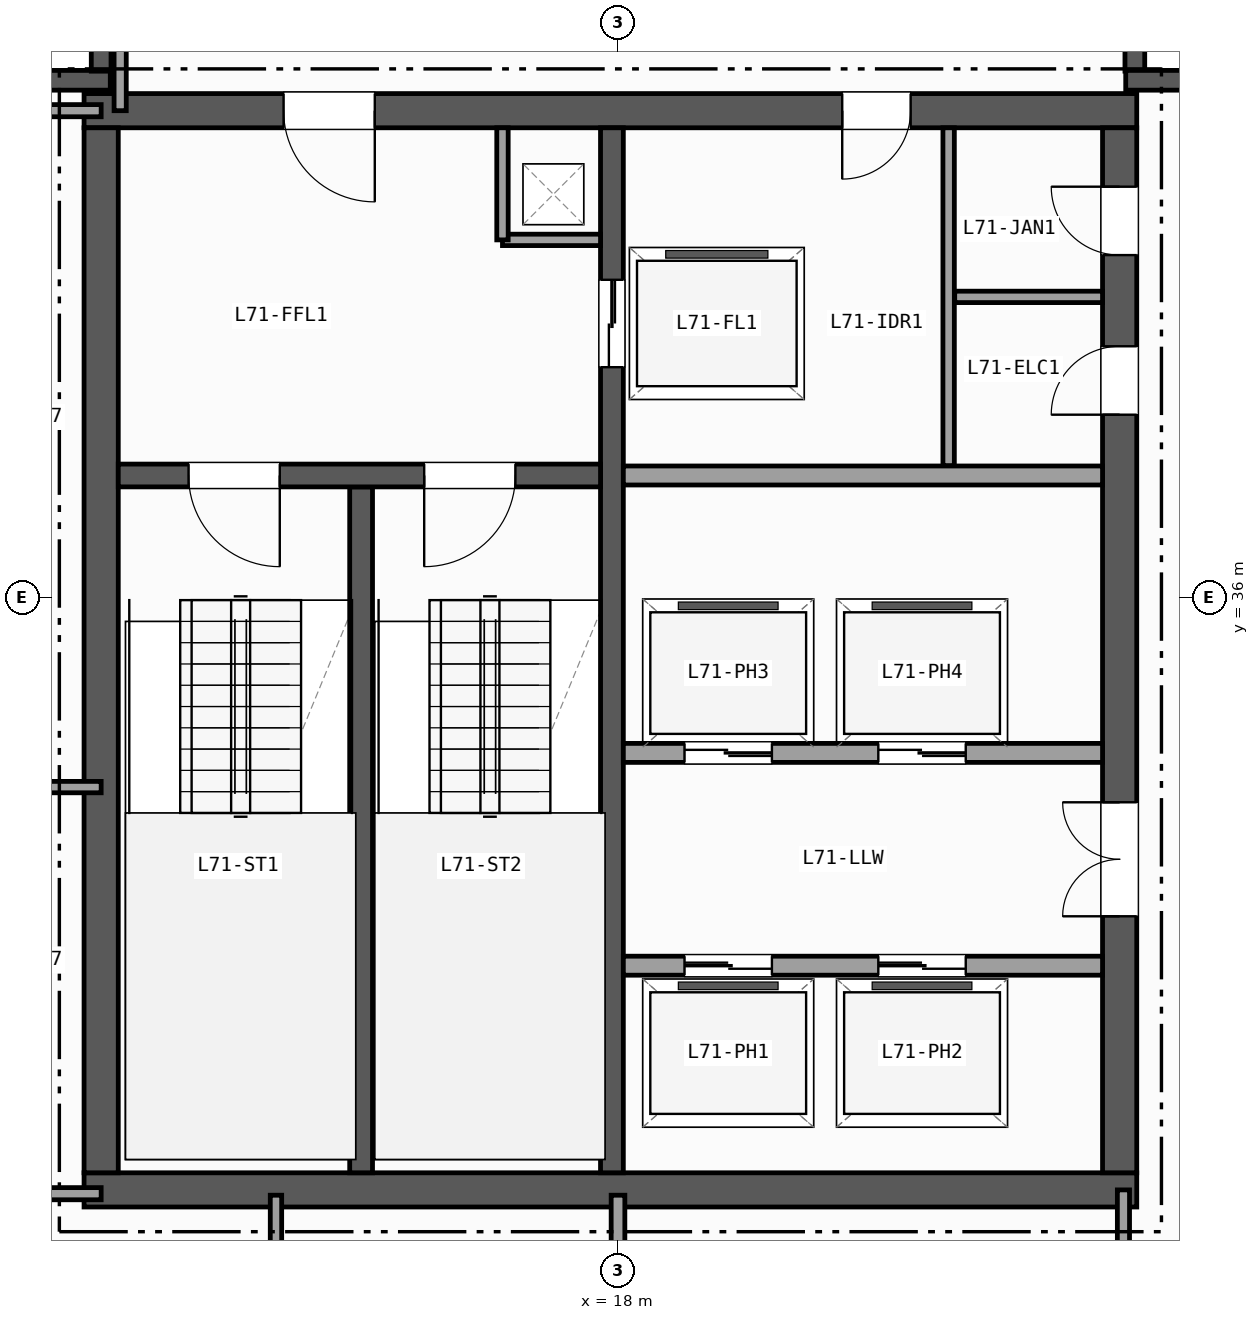
"""IFC4 building model, lengths in metres.
Left out: names, types, materials, properties, quantities, classifications, styles, units other than length and angle.
Written with IfcOpenShell. Run it as: python <this file> out.ifc"""

import sys

from ifc_helpers import new_model, si_unit, direction, frame, frame_2d, origin, place, context, subcontext, project, spatial, rectangle, extrude, element, fill, save


model = new_model("IFC4")
c1 = context("Model", 3, precision=1e-05, world=origin(), true_north=direction((0.0, 1.0)))
c2 = subcontext(c1, "Body", "Model", "MODEL_VIEW")
j1 = project(units=[si_unit("LENGTHUNIT", "METRE"), si_unit("PLANEANGLEUNIT", "RADIAN")], contexts=[c1])
p1 = place(None, origin())
s1 = spatial("IfcSite", under=j1, at=p1, CompositionType="ELEMENT")
p2 = place(p1, origin())
s2 = spatial("IfcBuilding", under=s1, at=p2, CompositionType="ELEMENT")
p3 = place(p2, frame((0.0, 0.0, 281.5)))
s3 = spatial("IfcBuildingStorey", under=s2, at=p3, CompositionType="ELEMENT", Elevation=281.5)
p4 = place(p3, frame((9.0, 42.8, 0.0), z_axis=(0.0, 0.0, 1.0), x_axis=(1.0, 0.0, 0.0)))
e1 = element("IfcWall", 1, at=p4, inside=s3, PredefinedType="SOLIDWALL", context=c2, shape_type="SweptSolid", body=[
    extrude(rectangle(XDim=2.32, YDim=0.26, at=frame_2d((1.16, 0.0))), origin(), (0.0, 0.0, 1.0), 3.37),
])
for number, where, z_axis, x_axis in (
    (2, (11.2, 42.92, 0.0), (0.0, 0.0, 1.0), (0.0, 1.0, 0.0)),
    (3, (24.8, 45.0, 0.0), (0.0, 0.0, 1.0), (0.0, -1.0, 0.0)),
):
    element("IfcWall", number, at=place(p3, frame(where, z_axis=z_axis, x_axis=x_axis)), inside=s3, PredefinedType="SOLIDWALL", context=c2, shape_type="SweptSolid", body=[
        extrude(rectangle(XDim=2.08, YDim=0.26, at=frame_2d((1.04, 0.0))), origin(), (0.0, 0.0, 1.0), 3.37),
    ])
p5 = place(p3, frame((24.68, 42.8, 0.0), z_axis=(0.0, 0.0, 1.0), x_axis=(1.0, 0.0, 0.0)))
e4 = element("IfcWall", 4, at=p5, inside=s3, PredefinedType="SOLIDWALL", context=c2, shape_type="SweptSolid", body=[
    extrude(rectangle(XDim=2.32, YDim=0.26, at=frame_2d((1.16, 0.0))), origin(), (0.0, 0.0, 1.0), 3.37),
])
p6 = place(p3, frame((10.975, 28.2, 0.0), z_axis=(0.0, 0.0, 1.0), x_axis=(1.0, 0.0, 0.0)))
e5 = element("IfcWall", 5, at=p6, inside=s3, PredefinedType="SHEAR", context=c2, shape_type="SweptSolid", body=[
    extrude(rectangle(XDim=13.85, YDim=0.45, at=frame_2d((6.925, 0.0))), origin(), (0.0, 0.0, 1.0), 3.37),
])
p7 = place(p3, frame((24.825, 42.4, 0.0), z_axis=(0.0, 0.0, 1.0), x_axis=(-1.0, 0.0, 0.0)))
e6 = element("IfcWall", 6, at=p7, inside=s3, PredefinedType="SHEAR", context=c2, shape_type="SweptSolid", body=[
    extrude(rectangle(XDim=13.85, YDim=0.45, at=frame_2d((6.925, 0.0))), origin(), (0.0, 0.0, 1.0), 3.37),
])
p8 = place(p7, frame((10.025, 0.0, 0.0)))
e7 = element("IfcOpeningElement", 7, at=p8, cuts=e6, PredefinedType="OPENING", context=c2, shape_type="SweptSolid", body=[
    extrude(rectangle(XDim=1.2, YDim=2.15, at=frame_2d((0.6, 1.075))), frame((0.0, 0.235, 0.0), z_axis=(0.0, -1.0, 0.0), x_axis=(1.0, 0.0, 0.0)), (0.0, 0.0, 1.0), 0.47),
])
p9 = place(p7, frame((2.975, 0.0, 0.0)))
e8 = element("IfcOpeningElement", 8, at=p9, cuts=e6, PredefinedType="OPENING", context=c2, shape_type="SweptSolid", body=[
    extrude(rectangle(XDim=0.9, YDim=2.1, at=frame_2d((0.45, 1.05))), frame((0.0, 0.235, 0.0), z_axis=(0.0, -1.0, 0.0), x_axis=(1.0, 0.0, 0.0)), (0.0, 0.0, 1.0), 0.47),
])
p10 = place(p3, frame((11.2, 42.175, 0.0), z_axis=(0.0, 0.0, 1.0), x_axis=(0.0, -1.0, 0.0)))
e9 = element("IfcWall", 9, at=p10, inside=s3, PredefinedType="SHEAR", context=c2, shape_type="SweptSolid", body=[
    extrude(rectangle(XDim=13.75, YDim=0.45, at=frame_2d((6.875, 0.0))), origin(), (0.0, 0.0, 1.0), 3.37),
])
p11 = place(p3, frame((24.6, 28.425, 0.0), z_axis=(0.0, 0.0, 1.0), x_axis=(0.0, 1.0, 0.0)))
e10 = element("IfcWall", 10, at=p11, inside=s3, PredefinedType="SHEAR", context=c2, shape_type="SweptSolid", body=[
    extrude(rectangle(XDim=13.75, YDim=0.45, at=frame_2d((6.875, 0.0))), origin(), (0.0, 0.0, 1.0), 3.37),
])
p12 = place(p11, frame((3.375, 0.0, 0.0)))
e11 = element("IfcOpeningElement", 11, at=p12, cuts=e10, PredefinedType="OPENING", context=c2, shape_type="SweptSolid", body=[
    extrude(rectangle(XDim=1.5, YDim=2.2, at=frame_2d((0.75, 1.1))), frame((0.0, 0.235, 0.0), z_axis=(0.0, -1.0, 0.0), x_axis=(1.0, 0.0, 0.0)), (0.0, 0.0, 1.0), 0.47),
])
p13 = place(p11, frame((9.975, 0.0, 0.0)))
e12 = element("IfcOpeningElement", 12, at=p13, cuts=e10, PredefinedType="OPENING", context=c2, shape_type="SweptSolid", body=[
    extrude(rectangle(XDim=0.9, YDim=2.1, at=frame_2d((0.45, 1.05))), frame((0.0, 0.235, 0.0), z_axis=(0.0, -1.0, 0.0), x_axis=(1.0, 0.0, 0.0)), (0.0, 0.0, 1.0), 0.47),
])
p14 = place(p11, frame((12.075, 0.0, 0.0)))
e13 = element("IfcOpeningElement", 13, at=p14, cuts=e10, PredefinedType="OPENING", context=c2, shape_type="SweptSolid", body=[
    extrude(rectangle(XDim=0.9, YDim=2.1, at=frame_2d((0.45, 1.05))), frame((0.0, 0.235, 0.0), z_axis=(0.0, -1.0, 0.0), x_axis=(1.0, 0.0, 0.0)), (0.0, 0.0, 1.0), 0.47),
])
p15 = place(p3, frame((14.62, 28.425, 0.0), z_axis=(0.0, 0.0, 1.0), x_axis=(0.0, 1.0, 0.0)))
e14 = element("IfcWall", 14, at=p15, inside=s3, PredefinedType="SHEAR", context=c2, shape_type="SweptSolid", body=[
    extrude(rectangle(XDim=9.025, YDim=0.3, at=frame_2d((4.512, 0.0))), origin(), (0.0, 0.0, 1.0), 3.37),
])
p16 = place(p3, frame((17.92, 42.175, 0.0), z_axis=(0.0, 0.0, 1.0), x_axis=(0.0, -1.0, 0.0)))
e15 = element("IfcWall", 15, at=p16, inside=s3, PredefinedType="SHEAR", context=c2, shape_type="SweptSolid", body=[
    extrude(rectangle(XDim=13.75, YDim=0.3, at=frame_2d((6.875, 0.0))), origin(), (0.0, 0.0, 1.0), 3.37),
])
p17 = place(p16, frame((2.0, 0.0, 0.0)))
e16 = element("IfcOpeningElement", 16, at=p17, cuts=e15, PredefinedType="OPENING", context=c2, shape_type="SweptSolid", body=[
    extrude(rectangle(XDim=1.15, YDim=2.15, at=frame_2d((0.575, 1.075))), frame((0.0, 0.16, 0.0), z_axis=(0.0, -1.0, 0.0), x_axis=(1.0, 0.0, 0.0)), (0.0, 0.0, 1.0), 0.32),
])
p18 = place(p3, frame((17.77, 37.6, 0.0), z_axis=(0.0, 0.0, 1.0), x_axis=(-1.0, 0.0, 0.0)))
e17 = element("IfcWall", 17, at=p18, inside=s3, PredefinedType="SHEAR", context=c2, shape_type="SweptSolid", body=[
    extrude(rectangle(XDim=6.345, YDim=0.3, at=frame_2d((3.172, 0.0))), origin(), (0.0, 0.0, 1.0), 3.37),
])
p19 = place(p18, frame((4.22, 0.0, 0.0)))
e18 = element("IfcOpeningElement", 18, at=p19, cuts=e17, PredefinedType="OPENING", context=c2, shape_type="SweptSolid", body=[
    extrude(rectangle(XDim=1.2, YDim=2.15, at=frame_2d((0.6, 1.075))), frame((0.0, 0.16, 0.0), z_axis=(0.0, -1.0, 0.0), x_axis=(1.0, 0.0, 0.0)), (0.0, 0.0, 1.0), 0.32),
])
p20 = place(p18, frame((1.12, 0.0, 0.0)))
e19 = element("IfcOpeningElement", 19, at=p20, cuts=e17, PredefinedType="OPENING", context=c2, shape_type="SweptSolid", body=[
    extrude(rectangle(XDim=1.2, YDim=2.15, at=frame_2d((0.6, 1.075))), frame((0.0, 0.16, 0.0), z_axis=(0.0, -1.0, 0.0), x_axis=(1.0, 0.0, 0.0)), (0.0, 0.0, 1.0), 0.32),
])
p21 = place(p3, frame((16.48, 40.7, 0.0), z_axis=(0.0, 0.0, 1.0), x_axis=(1.0, 0.0, 0.0)))
e20 = element("IfcWall", 20, at=p21, inside=s3, PredefinedType="PARTITIONING", context=c2, shape_type="SweptSolid", body=[
    extrude(rectangle(XDim=1.29, YDim=0.15, at=frame_2d((0.645, 0.0))), origin(), (0.0, 0.0, 1.0), 3.37),
])
p22 = place(p3, frame((16.48, 40.7, 0.0), z_axis=(0.0, 0.0, 1.0), x_axis=(0.0, 1.0, 0.0)))
e21 = element("IfcWall", 21, at=p22, inside=s3, PredefinedType="PARTITIONING", context=c2, shape_type="SweptSolid", body=[
    extrude(rectangle(XDim=1.475, YDim=0.15, at=frame_2d((0.738, 0.0))), origin(), (0.0, 0.0, 1.0), 3.37),
])
p23 = place(p3, frame((18.07, 37.6, 0.0), z_axis=(0.0, 0.0, 1.0), x_axis=(1.0, 0.0, 0.0)))
e22 = element("IfcWall", 22, at=p23, inside=s3, PredefinedType="PARTITIONING", context=c2, shape_type="SweptSolid", body=[
    extrude(rectangle(XDim=6.305, YDim=0.25, at=frame_2d((3.152, 0.0))), origin(), (0.0, 0.0, 1.0), 3.37),
])
p24 = place(p3, frame((18.07, 31.15, 0.0), z_axis=(0.0, 0.0, 1.0), x_axis=(1.0, 0.0, 0.0)))
e23 = element("IfcWall", 23, at=p24, inside=s3, PredefinedType="PARTITIONING", context=c2, shape_type="SweptSolid", body=[
    extrude(rectangle(XDim=6.305, YDim=0.25, at=frame_2d((3.152, 0.0))), origin(), (0.0, 0.0, 1.0), 3.37),
])
p25 = place(p24, frame((0.805, 0.0, 0.0)))
e24 = element("IfcOpeningElement", 24, at=p25, cuts=e23, PredefinedType="OPENING", context=c2, shape_type="SweptSolid", body=[
    extrude(rectangle(XDim=1.15, YDim=2.15, at=frame_2d((0.575, 1.075))), frame((0.0, 0.135, 0.0), z_axis=(0.0, -1.0, 0.0), x_axis=(1.0, 0.0, 0.0)), (0.0, 0.0, 1.0), 0.27),
])
p26 = place(p24, frame((3.355, 0.0, 0.0)))
e25 = element("IfcOpeningElement", 25, at=p26, cuts=e23, PredefinedType="OPENING", context=c2, shape_type="SweptSolid", body=[
    extrude(rectangle(XDim=1.15, YDim=2.15, at=frame_2d((0.575, 1.075))), frame((0.0, 0.135, 0.0), z_axis=(0.0, -1.0, 0.0), x_axis=(1.0, 0.0, 0.0)), (0.0, 0.0, 1.0), 0.27),
])
p27 = place(p3, frame((24.375, 33.95, 0.0), z_axis=(0.0, 0.0, 1.0), x_axis=(-1.0, 0.0, 0.0)))
e26 = element("IfcWall", 26, at=p27, inside=s3, PredefinedType="PARTITIONING", context=c2, shape_type="SweptSolid", body=[
    extrude(rectangle(XDim=6.305, YDim=0.25, at=frame_2d((3.152, 0.0))), origin(), (0.0, 0.0, 1.0), 3.37),
])
p28 = place(p27, frame((4.35, 0.0, 0.0)))
e27 = element("IfcOpeningElement", 27, at=p28, cuts=e26, PredefinedType="OPENING", context=c2, shape_type="SweptSolid", body=[
    extrude(rectangle(XDim=1.15, YDim=2.15, at=frame_2d((0.575, 1.075))), frame((0.0, 0.135, 0.0), z_axis=(0.0, -1.0, 0.0), x_axis=(1.0, 0.0, 0.0)), (0.0, 0.0, 1.0), 0.27),
])
p29 = place(p27, frame((1.8, 0.0, 0.0)))
e28 = element("IfcOpeningElement", 28, at=p29, cuts=e26, PredefinedType="OPENING", context=c2, shape_type="SweptSolid", body=[
    extrude(rectangle(XDim=1.15, YDim=2.15, at=frame_2d((0.575, 1.075))), frame((0.0, 0.135, 0.0), z_axis=(0.0, -1.0, 0.0), x_axis=(1.0, 0.0, 0.0)), (0.0, 0.0, 1.0), 0.27),
])
p30 = place(p3, frame((22.35, 37.73, 0.0), z_axis=(0.0, 0.0, 1.0), x_axis=(0.0, 1.0, 0.0)))
e29 = element("IfcWall", 29, at=p30, inside=s3, PredefinedType="PARTITIONING", context=c2, shape_type="SweptSolid", body=[
    extrude(rectangle(XDim=4.445, YDim=0.15, at=frame_2d((2.223, 0.0))), origin(), (0.0, 0.0, 1.0), 3.37),
])
p31 = place(p3, frame((22.43, 39.95, 0.0), z_axis=(0.0, 0.0, 1.0), x_axis=(1.0, 0.0, 0.0)))
e30 = element("IfcWall", 30, at=p31, inside=s3, PredefinedType="PARTITIONING", context=c2, shape_type="SweptSolid", body=[
    extrude(rectangle(XDim=1.945, YDim=0.15, at=frame_2d((0.973, 0.0))), origin(), (0.0, 0.0, 1.0), 3.37),
])
p32 = place(p3, frame((9.0, 28.15, 0.0), z_axis=(0.0, 0.0, 1.0), x_axis=(1.0, 0.0, 0.0)))
e31 = element("IfcWall", 31, at=p32, inside=s3, PredefinedType="PARTITIONING", context=c2, shape_type="SweptSolid", body=[
    extrude(rectangle(XDim=2.2, YDim=0.16, at=frame_2d((1.1, 0.0))), origin(), (0.0, 0.0, 1.0), 2.657),
])
p33 = place(p32, frame((0.45, 0.0, 0.0)))
e32 = element("IfcOpeningElement", 32, at=p33, cuts=e31, PredefinedType="OPENING", context=c2, shape_type="SweptSolid", body=[
    extrude(rectangle(XDim=0.86, YDim=2.05, at=frame_2d((0.43, 1.025))), frame((0.0, 0.09, 0.0), z_axis=(0.0, -1.0, 0.0), x_axis=(1.0, 0.0, 0.0)), (0.0, 0.0, 1.0), 0.18),
])
p34 = place(p3, frame((8.761, 42.4, 0.0), z_axis=(0.0, 0.0, 1.0), x_axis=(1.0, 0.0, 0.0)))
e33 = element("IfcWall", 33, at=p34, inside=s3, PredefinedType="PARTITIONING", context=c2, shape_type="SweptSolid", body=[
    extrude(rectangle(XDim=2.439, YDim=0.16, at=frame_2d((1.219, 0.0))), origin(), (0.0, 0.0, 1.0), 3.37),
])
p35 = place(p3, frame((11.45, 42.4, 0.0), z_axis=(0.0, 0.0, 1.0), x_axis=(0.0, 1.0, 0.0)))
e34 = element("IfcWall", 34, at=p35, inside=s3, PredefinedType="PARTITIONING", context=c2, shape_type="SweptSolid", body=[
    extrude(rectangle(XDim=2.666, YDim=0.16, at=frame_2d((1.333, 0.0))), origin(), (0.0, 0.0, 1.0), 3.37),
])
p36 = place(p3, frame((9.0, 33.5, 0.0), z_axis=(0.0, 0.0, 1.0), x_axis=(1.0, 0.0, 0.0)))
e35 = element("IfcWall", 35, at=p36, inside=s3, PredefinedType="PARTITIONING", context=c2, shape_type="SweptSolid", body=[
    extrude(rectangle(XDim=2.2, YDim=0.15, at=frame_2d((1.1, 0.0))), origin(), (0.0, 0.0, 1.0), 2.657),
])
p37 = place(p36, frame((0.45, 0.0, 0.0)))
e36 = element("IfcOpeningElement", 36, at=p37, cuts=e35, PredefinedType="OPENING", context=c2, shape_type="SweptSolid", body=[
    extrude(rectangle(XDim=0.9, YDim=2.1, at=frame_2d((0.45, 1.05))), frame((0.0, 0.085, 0.0), z_axis=(0.0, -1.0, 0.0), x_axis=(1.0, 0.0, 0.0)), (0.0, 0.0, 1.0), 0.17),
])
p38 = place(p3, frame((24.65, 9.0, 0.0), z_axis=(0.0, 0.0, 1.0), x_axis=(0.0, 1.0, 0.0)))
e37 = element("IfcWall", 37, at=p38, inside=s3, PredefinedType="PARTITIONING", context=c2, shape_type="SweptSolid", body=[
    extrude(rectangle(XDim=19.2, YDim=0.16, at=frame_2d((9.6, 0.0))), origin(), (0.0, 0.0, 1.0), 2.657),
])
p39 = place(p38, frame((15.2, 0.0, 0.0)))
e38 = element("IfcOpeningElement", 38, at=p39, cuts=e37, PredefinedType="OPENING", context=c2, shape_type="SweptSolid", body=[
    extrude(rectangle(XDim=1.0, YDim=2.1, at=frame_2d((0.5, 1.05))), frame((0.0, 0.09, 0.0), z_axis=(0.0, -1.0, 0.0), x_axis=(1.0, 0.0, 0.0)), (0.0, 0.0, 1.0), 0.18),
])
p40 = place(p38, frame((10.5, 0.0, 0.0)))
e39 = element("IfcOpeningElement", 39, at=p40, cuts=e37, PredefinedType="OPENING", context=c2, shape_type="SweptSolid", body=[
    extrude(rectangle(XDim=1.05, YDim=2.15, at=frame_2d((0.525, 1.075))), frame((0.0, 0.09, 0.0), z_axis=(0.0, -1.0, 0.0), x_axis=(1.0, 0.0, 0.0)), (0.0, 0.0, 1.0), 0.18),
])
p41 = place(p38, frame((6.0, 0.0, 0.0)))
e40 = element("IfcOpeningElement", 40, at=p41, cuts=e37, PredefinedType="OPENING", context=c2, shape_type="SweptSolid", body=[
    extrude(rectangle(XDim=1.2, YDim=2.15, at=frame_2d((0.6, 1.075))), frame((0.0, 0.09, 0.0), z_axis=(0.0, -1.0, 0.0), x_axis=(1.0, 0.0, 0.0)), (0.0, 0.0, 1.0), 0.18),
])
p42 = place(p38, frame((2.55, 0.0, 0.0)))
e41 = element("IfcOpeningElement", 41, at=p42, cuts=e37, PredefinedType="OPENING", context=c2, shape_type="SweptSolid", body=[
    extrude(rectangle(XDim=0.86, YDim=2.05, at=frame_2d((0.43, 1.025))), frame((0.0, 0.09, 0.0), z_axis=(0.0, -1.0, 0.0), x_axis=(1.0, 0.0, 0.0)), (0.0, 0.0, 1.0), 0.18),
])
p43 = place(p3, frame((18.0, 9.0, 0.0), z_axis=(0.0, 0.0, 1.0), x_axis=(0.0, 1.0, 0.0)))
e42 = element("IfcWall", 42, at=p43, inside=s3, PredefinedType="PARTITIONING", context=c2, shape_type="SweptSolid", body=[
    extrude(rectangle(XDim=19.13, YDim=0.18, at=frame_2d((9.565, 0.0))), origin(), (0.0, 0.0, 1.0), 2.657),
])
p44 = place(p43, frame((11.5, 0.0, 0.0)))
e43 = element("IfcOpeningElement", 43, at=p44, cuts=e42, PredefinedType="OPENING", context=c2, shape_type="SweptSolid", body=[
    extrude(rectangle(XDim=0.95, YDim=2.1, at=frame_2d((0.475, 1.05))), frame((0.0, 0.1, 0.0), z_axis=(0.0, -1.0, 0.0), x_axis=(1.0, 0.0, 0.0)), (0.0, 0.0, 1.0), 0.2),
])
p45 = place(p43, frame((3.0, 0.0, 0.0)))
e44 = element("IfcOpeningElement", 44, at=p45, cuts=e42, PredefinedType="OPENING", context=c2, shape_type="SweptSolid", body=[
    extrude(rectangle(XDim=1.05, YDim=2.15, at=frame_2d((0.525, 1.075))), frame((0.0, 0.1, 0.0), z_axis=(0.0, -1.0, 0.0), x_axis=(1.0, 0.0, 0.0)), (0.0, 0.0, 1.0), 0.2),
])
p46 = place(p3, frame((13.5, 18.0, 0.0), z_axis=(0.0, 0.0, 1.0), x_axis=(0.0, 1.0, 0.0)))
e45 = element("IfcWall", 45, at=p46, inside=s3, PredefinedType="PARTITIONING", context=c2, shape_type="SweptSolid", body=[
    extrude(rectangle(XDim=10.13, YDim=0.15, at=frame_2d((5.065, 0.0))), origin(), (0.0, 0.0, 1.0), 2.739),
])
p47 = place(p46, frame((3.0, 0.0, 0.0)))
e46 = element("IfcOpeningElement", 46, at=p47, cuts=e45, PredefinedType="OPENING", context=c2, shape_type="SweptSolid", body=[
    extrude(rectangle(XDim=0.9, YDim=2.1, at=frame_2d((0.45, 1.05))), frame((0.0, 0.085, 0.0), z_axis=(0.0, -1.0, 0.0), x_axis=(1.0, 0.0, 0.0)), (0.0, 0.0, 1.0), 0.17),
])
p48 = place(p19, origin())
e47 = element("IfcDoor", 47, at=p48, inside=s3, OperationType="SINGLE_SWING_LEFT", PredefinedType="DOOR", context=c2, shape_type="SweptSolid", body=[
    extrude(rectangle(XDim=1.2, YDim=2.15, at=frame_2d((0.6, 1.075))), frame((0.0, 0.025, 0.0), z_axis=(0.0, -1.0, 0.0), x_axis=(1.0, 0.0, 0.0)), (0.0, 0.0, 1.0), 0.05),
])
fill(e18, e47)
p49 = place(p20, origin())
e48 = element("IfcDoor", 48, at=p49, inside=s3, OperationType="SINGLE_SWING_RIGHT", PredefinedType="DOOR", context=c2, shape_type="SweptSolid", body=[
    extrude(rectangle(XDim=1.2, YDim=2.15, at=frame_2d((0.6, 1.075))), frame((0.0, 0.025, 0.0), z_axis=(0.0, -1.0, 0.0), x_axis=(1.0, 0.0, 0.0)), (0.0, 0.0, 1.0), 0.05),
])
fill(e19, e48)
p50 = place(p12, origin())
e49 = element("IfcDoor", 49, at=p50, inside=s3, OperationType="DOUBLE_DOOR_SINGLE_SWING", PredefinedType="DOOR", context=c2, shape_type="SweptSolid", body=[
    extrude(rectangle(XDim=1.5, YDim=2.2, at=frame_2d((0.75, 1.1))), frame((0.0, 0.025, 0.0), z_axis=(0.0, -1.0, 0.0), x_axis=(1.0, 0.0, 0.0)), (0.0, 0.0, 1.0), 0.05),
])
fill(e11, e49)
p51 = place(p8, origin())
e50 = element("IfcDoor", 50, at=p51, inside=s3, OperationType="SINGLE_SWING_LEFT", PredefinedType="DOOR", context=c2, shape_type="SweptSolid", body=[
    extrude(rectangle(XDim=1.2, YDim=2.15, at=frame_2d((0.6, 1.075))), frame((0.0, 0.025, 0.0), z_axis=(0.0, -1.0, 0.0), x_axis=(1.0, 0.0, 0.0)), (0.0, 0.0, 1.0), 0.05),
])
fill(e7, e50)
p52 = place(p13, origin())
e51 = element("IfcDoor", 51, at=p52, inside=s3, OperationType="SINGLE_SWING_LEFT", PredefinedType="DOOR", context=c2, shape_type="SweptSolid", body=[
    extrude(rectangle(XDim=0.9, YDim=2.1, at=frame_2d((0.45, 1.05))), frame((0.0, 0.025, 0.0), z_axis=(0.0, -1.0, 0.0), x_axis=(1.0, 0.0, 0.0)), (0.0, 0.0, 1.0), 0.05),
])
fill(e12, e51)
p53 = place(p9, origin())
e52 = element("IfcDoor", 52, at=p53, inside=s3, OperationType="SINGLE_SWING_RIGHT", PredefinedType="DOOR", context=c2, shape_type="SweptSolid", body=[
    extrude(rectangle(XDim=0.9, YDim=2.1, at=frame_2d((0.45, 1.05))), frame((0.0, 0.025, 0.0), z_axis=(0.0, -1.0, 0.0), x_axis=(1.0, 0.0, 0.0)), (0.0, 0.0, 1.0), 0.05),
])
fill(e8, e52)
p54 = place(p14, origin())
e53 = element("IfcDoor", 53, at=p54, inside=s3, OperationType="SINGLE_SWING_RIGHT", PredefinedType="DOOR", context=c2, shape_type="SweptSolid", body=[
    extrude(rectangle(XDim=0.9, YDim=2.1, at=frame_2d((0.45, 1.05))), frame((0.0, 0.025, 0.0), z_axis=(0.0, -1.0, 0.0), x_axis=(1.0, 0.0, 0.0)), (0.0, 0.0, 1.0), 0.05),
])
fill(e13, e53)
p55 = place(p17, origin())
e54 = element("IfcDoor", 54, at=p55, inside=s3, OperationType="DOUBLE_DOOR_SLIDING", PredefinedType="DOOR", context=c2, shape_type="SweptSolid", body=[
    extrude(rectangle(XDim=1.15, YDim=2.15, at=frame_2d((0.575, 1.075))), frame((0.0, 0.025, 0.0), z_axis=(0.0, -1.0, 0.0), x_axis=(1.0, 0.0, 0.0)), (0.0, 0.0, 1.0), 0.05),
])
fill(e16, e54)
p56 = place(p25, origin())
e55 = element("IfcDoor", 55, at=p56, inside=s3, OperationType="DOUBLE_DOOR_SLIDING", PredefinedType="DOOR", context=c2, shape_type="SweptSolid", body=[
    extrude(rectangle(XDim=1.15, YDim=2.15, at=frame_2d((0.575, 1.075))), frame((0.0, 0.025, 0.0), z_axis=(0.0, -1.0, 0.0), x_axis=(1.0, 0.0, 0.0)), (0.0, 0.0, 1.0), 0.05),
])
fill(e24, e55)
p57 = place(p26, origin())
e56 = element("IfcDoor", 56, at=p57, inside=s3, OperationType="DOUBLE_DOOR_SLIDING", PredefinedType="DOOR", context=c2, shape_type="SweptSolid", body=[
    extrude(rectangle(XDim=1.15, YDim=2.15, at=frame_2d((0.575, 1.075))), frame((0.0, 0.025, 0.0), z_axis=(0.0, -1.0, 0.0), x_axis=(1.0, 0.0, 0.0)), (0.0, 0.0, 1.0), 0.05),
])
fill(e25, e56)
p58 = place(p28, origin())
e57 = element("IfcDoor", 57, at=p58, inside=s3, OperationType="DOUBLE_DOOR_SLIDING", PredefinedType="DOOR", context=c2, shape_type="SweptSolid", body=[
    extrude(rectangle(XDim=1.15, YDim=2.15, at=frame_2d((0.575, 1.075))), frame((0.0, 0.025, 0.0), z_axis=(0.0, -1.0, 0.0), x_axis=(1.0, 0.0, 0.0)), (0.0, 0.0, 1.0), 0.05),
])
fill(e27, e57)
p59 = place(p29, origin())
e58 = element("IfcDoor", 58, at=p59, inside=s3, OperationType="DOUBLE_DOOR_SLIDING", PredefinedType="DOOR", context=c2, shape_type="SweptSolid", body=[
    extrude(rectangle(XDim=1.15, YDim=2.15, at=frame_2d((0.575, 1.075))), frame((0.0, 0.025, 0.0), z_axis=(0.0, -1.0, 0.0), x_axis=(1.0, 0.0, 0.0)), (0.0, 0.0, 1.0), 0.05),
])
fill(e28, e58)
save(model, sys.argv[1])
